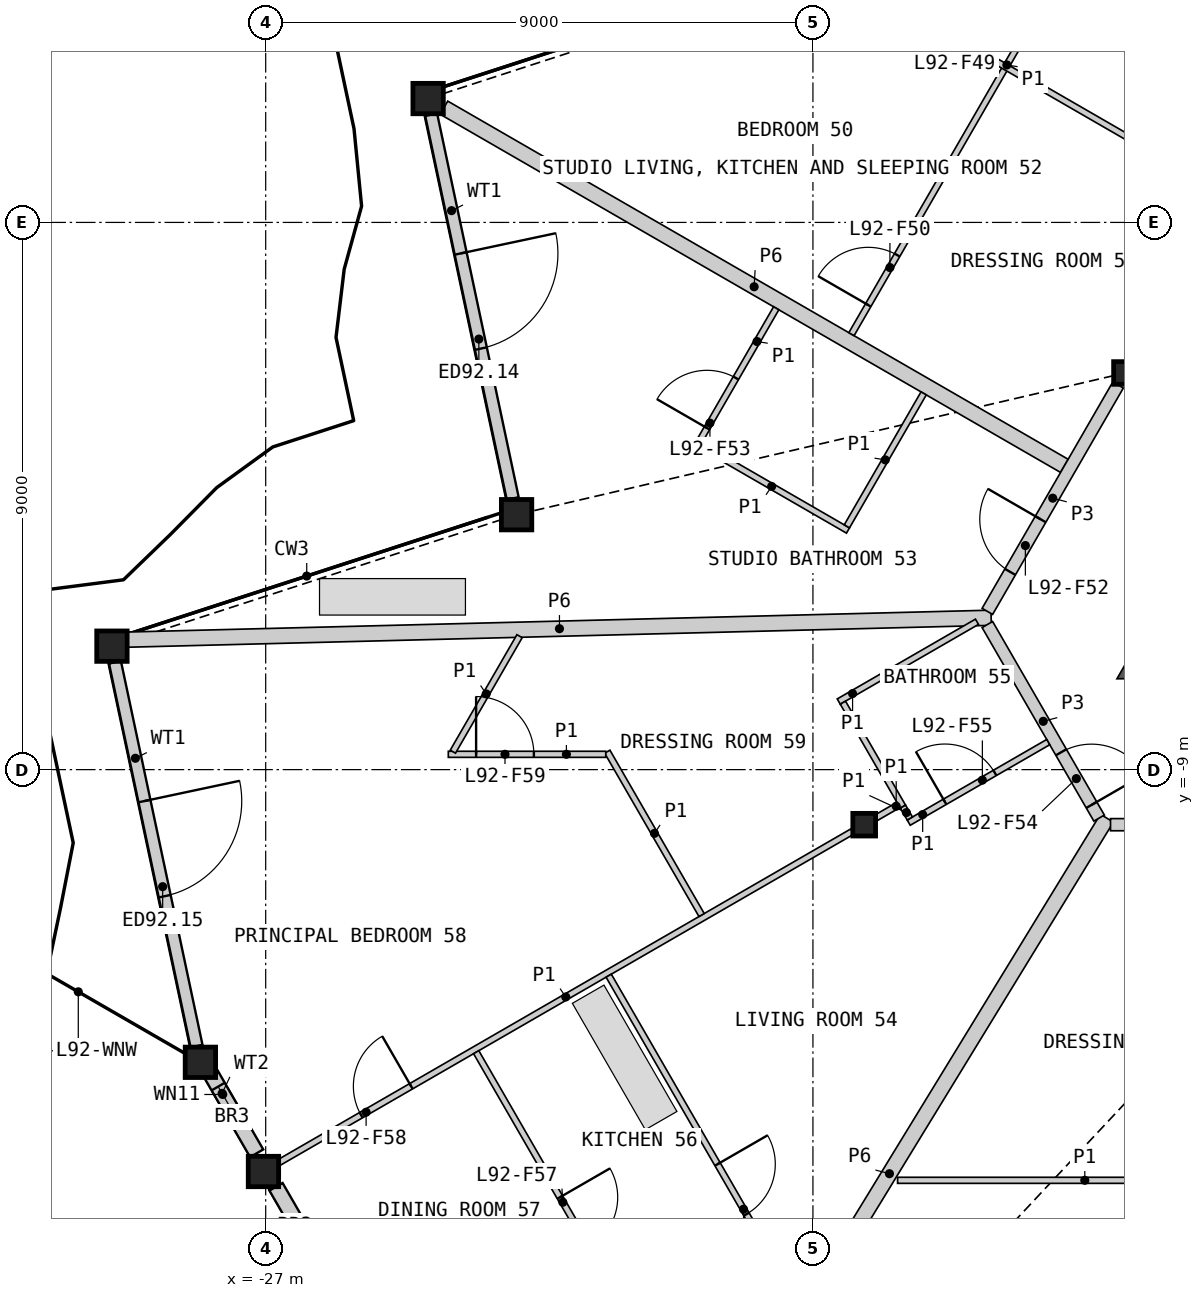
"""IFC4 building model, lengths in metres.
Left out: names, types, materials, properties, quantities, classifications, styles, units other than length and angle.
Written with IfcOpenShell. Run it as: python <this file> out.ifc"""

import sys

from ifc_helpers import new_model, si_unit, direction, frame, frame_2d, origin, origin_2d, place, context, subcontext, project, spatial, polyline, rectangle, hollow_rectangle, i_section, outline, extrude, element, fill, save


model = new_model("IFC4")
c1 = context("Model", 3, precision=1e-05, world=origin(), true_north=direction((0.0, 1.0)))
c2 = subcontext(c1, "Body", "Model", "MODEL_VIEW")
j1 = project(units=[si_unit("LENGTHUNIT", "METRE"), si_unit("PLANEANGLEUNIT", "RADIAN")], contexts=[c1])
p1 = place(None, origin())
s1 = spatial("IfcSite", under=j1, at=p1, CompositionType="ELEMENT")
p2 = place(p1, origin())
s2 = spatial("IfcBuilding", under=s1, at=p2, CompositionType="ELEMENT")
p3 = place(p2, frame((0.0, 0.0, 401.8)))
s3 = spatial("IfcBuildingStorey", under=s2, at=p3, CompositionType="ELEMENT", Elevation=401.8)
for number, where, z_axis, x_axis in (
    (1, (-24.329, 2.037, 0.0), (0.0, 0.0, 1.0), (1.0, 0.0, 0.0)),
    (2, (-22.874, -4.807, 0.0), (0.0, 0.0, 1.0), (1.0, 0.0, 0.0)),
    (3, (-29.529, -6.969, 0.0), (0.0, 0.0, 1.0), (1.0, 0.0, 0.0)),
    (4, (-28.074, -13.814, 0.0), (0.0, 0.0, 1.0), (1.0, 0.0, 0.0)),
    (5, (-27.037, -15.61, 0.0), (0.0, 0.0, 1.0), (1.0, 0.0, 0.0)),
):
    element("IfcColumn", number, at=place(p3, frame(where, z_axis=z_axis, x_axis=x_axis)), inside=s3, PredefinedType="COLUMN", context=c2, shape_type="SweptSolid", body=[
        extrude(hollow_rectangle(XDim=0.5, YDim=0.5, WallThickness=0.03, at=origin_2d()), origin(), (0.0, 0.0, 1.0), 3.4),
    ])
for number, where, z_axis, x_axis in (
    (6, (-12.868, -2.476, 0.0), (0.0, 0.0, 1.0), (1.0, 0.0, 0.0)),
    (7, (-17.157, -9.906, 0.0), (0.0, 0.0, 1.0), (1.0, 0.0, 0.0)),
):
    element("IfcColumn", number, at=place(p3, frame(where, z_axis=z_axis, x_axis=x_axis)), inside=s3, PredefinedType="COLUMN", context=c2, shape_type="SweptSolid", body=[
        extrude(i_section(OverallWidth=0.374, OverallDepth=0.372, WebThickness=0.016, FlangeThickness=0.026, at=origin_2d()), origin(), (0.0, 0.0, 1.0), 3.4),
    ])
p4 = place(p3, frame((-24.279, 1.772, 0.0), z_axis=(0.0, 0.0, 1.0), x_axis=(0.207924363149, -0.978144907061, 0.0)))
e8 = element("IfcWall", 8, at=p4, inside=s3, PredefinedType="SOLIDWALL", context=c2, shape_type="SweptSolid", body=[
    extrude(rectangle(XDim=6.453, YDim=0.2, at=frame_2d((3.227, 0.0))), origin(), (0.0, 0.0, 1.0), 2.634),
])
p5 = place(p4, frame((2.333, 0.0, 0.0)))
e9 = element("IfcOpeningElement", 9, at=p5, cuts=e8, PredefinedType="OPENING", context=c2, shape_type="SweptSolid", body=[
    extrude(rectangle(XDim=1.6, YDim=2.25, at=frame_2d((0.8, 1.125))), frame((0.0, 0.11, 0.0), z_axis=(0.0, -1.0, 0.0), x_axis=(1.0, 0.0, 0.0)), (0.0, 0.0, 1.0), 0.22),
])
p6 = place(p3, frame((-29.479, -7.235, 0.0), z_axis=(0.0, 0.0, 1.0), x_axis=(0.207932057694, -0.978143271399, 0.0)))
e10 = element("IfcWall", 10, at=p6, inside=s3, PredefinedType="SOLIDWALL", context=c2, shape_type="SweptSolid", body=[
    extrude(rectangle(XDim=6.453, YDim=0.2, at=frame_2d((3.227, 0.0))), origin(), (0.0, 0.0, 1.0), 2.634),
])
p7 = place(p6, frame((2.333, 0.0, 0.0)))
e11 = element("IfcOpeningElement", 11, at=p7, cuts=e10, PredefinedType="OPENING", context=c2, shape_type="SweptSolid", body=[
    extrude(rectangle(XDim=1.6, YDim=2.25, at=frame_2d((0.8, 1.125))), frame((0.0, 0.11, 0.0), z_axis=(0.0, -1.0, 0.0), x_axis=(1.0, 0.0, 0.0)), (0.0, 0.0, 1.0), 0.22),
])
p8 = place(p3, frame((-27.906, -13.997, 0.0), z_axis=(0.0, 0.0, 1.0), x_axis=(0.499931517724, -0.866064938435, 0.0)))
e12 = element("IfcWall", 12, at=p8, inside=s3, PredefinedType="SOLIDWALL", context=c2, shape_type="SweptSolid", body=[
    extrude(rectangle(XDim=1.516, YDim=0.25, at=frame_2d((0.758, 0.0))), origin(), (0.0, 0.0, 1.0), 2.634),
])
p9 = place(p8, frame((0.25, 0.0, 1.7)))
e13 = element("IfcOpeningElement", 13, at=p9, cuts=e12, PredefinedType="OPENING", context=c2, shape_type="SweptSolid", body=[
    extrude(rectangle(XDim=0.6, YDim=0.7, at=frame_2d((0.3, 0.35))), frame((0.0, 0.135, 0.0), z_axis=(0.0, -1.0, 0.0), x_axis=(1.0, 0.0, 0.0)), (0.0, 0.0, 1.0), 0.27),
])
p10 = place(p3, frame((-26.83, -15.861, 0.0), z_axis=(0.0, 0.0, 1.0), x_axis=(0.500048779063, -0.865997239347, 0.0)))
e14 = element("IfcWall", 14, at=p10, inside=s3, PredefinedType="SOLIDWALL", context=c2, shape_type="SweptSolid", body=[
    extrude(rectangle(XDim=1.511, YDim=0.25, at=frame_2d((0.755, 0.0))), origin(), (0.0, 0.0, 1.0), 2.634),
])
p11 = place(p3, origin())
e15 = element("IfcWall", 15, at=p11, inside=s3, PredefinedType="SHEAR", context=c2, shape_type="SweptSolid", body=[
    extrude(outline(polyline([(-12.48, -6.606), (-11.961, -6.906), (-11.961, -7.506), (-13.0, -7.506), (-12.48, -6.606)])), origin(), (0.0, 0.0, 1.0), 3.1),
])
p12 = place(p3, frame((-29.269, -6.862, 0.0), z_axis=(0.0, 0.0, 1.0), x_axis=(0.999679020594, 0.025334872878, 0.0)))
e16 = element("IfcWall", 16, at=p12, inside=s3, PredefinedType="PARTITIONING", context=c2, shape_type="SweptSolid", body=[
    extrude(rectangle(XDim=14.204, YDim=0.25, at=frame_2d((7.102, 0.0))), origin(), (0.0, 0.0, 1.0), 2.33),
])
p13 = place(p3, frame((-20.318, -21.493, 0.0), z_axis=(0.0, 0.0, 1.0), x_axis=(0.52177126778, 0.853085426039, 0.0)))
e17 = element("IfcWall", 17, at=p13, inside=s3, PredefinedType="PARTITIONING", context=c2, shape_type="SweptSolid", body=[
    extrude(rectangle(XDim=13.708, YDim=0.25, at=frame_2d((6.854, 0.0))), origin(), (0.0, 0.0, 1.0), 2.33),
])
p14 = place(p3, frame((-24.069, 1.887, 0.0), z_axis=(0.0, 0.0, 1.0), x_axis=(0.866023404247, -0.500003463284, 0.0)))
e18 = element("IfcWall", 18, at=p14, inside=s3, PredefinedType="PARTITIONING", context=c2, shape_type="SweptSolid", body=[
    extrude(rectangle(XDim=11.782, YDim=0.25, at=frame_2d((5.891, 0.0))), origin(), (0.0, 0.0, 1.0), 2.33),
])
p15 = place(p3, frame((-13.106, -9.906, 0.0), z_axis=(0.0, 0.0, 1.0), x_axis=(1.0, 0.0, 0.0)))
e19 = element("IfcWall", 19, at=p15, inside=s3, PredefinedType="PARTITIONING", context=c2, shape_type="SweptSolid", body=[
    extrude(rectangle(XDim=4.331, YDim=0.2, at=frame_2d((2.165, 0.0))), origin(), (0.0, 0.0, 1.0), 3.1),
])
p16 = place(p3, frame((-15.131, -6.397, 0.0), z_axis=(0.0, 0.0, 1.0), x_axis=(0.499986217557, 0.866033360935, 0.0)))
e20 = element("IfcWall", 20, at=p16, inside=s3, PredefinedType="PARTITIONING", context=c2, shape_type="SweptSolid", body=[
    extrude(rectangle(XDim=4.3, YDim=0.2, at=frame_2d((2.15, 0.0))), origin(), (0.0, 0.0, 1.0), 3.1),
])
p17 = place(p16, frame((0.75, 0.0, 0.0)))
e21 = element("IfcOpeningElement", 21, at=p17, cuts=e20, PredefinedType="OPENING", context=c2, shape_type="SweptSolid", body=[
    extrude(rectangle(XDim=1.0, YDim=2.1, at=frame_2d((0.5, 1.05))), frame((0.0, 0.11, 0.0), z_axis=(0.0, -1.0, 0.0), x_axis=(1.0, 0.0, 0.0)), (0.0, 0.0, 1.0), 0.22),
])
p18 = place(p3, frame((-15.131, -6.614, 0.0), z_axis=(0.0, 0.0, 1.0), x_axis=(0.499967746641, -0.866044024469, 0.0)))
e22 = element("IfcWall", 22, at=p18, inside=s3, PredefinedType="PARTITIONING", context=c2, shape_type="SweptSolid", body=[
    extrude(rectangle(XDim=3.676, YDim=0.2, at=frame_2d((1.838, 0.0))), origin(), (0.0, 0.0, 1.0), 3.1),
])
p19 = place(p18, frame((2.426, 0.0, 0.0)))
e23 = element("IfcOpeningElement", 23, at=p19, cuts=e22, PredefinedType="OPENING", context=c2, shape_type="SweptSolid", body=[
    extrude(rectangle(XDim=1.0, YDim=2.1, at=frame_2d((0.5, 1.05))), frame((0.0, 0.11, 0.0), z_axis=(0.0, -1.0, 0.0), x_axis=(1.0, 0.0, 0.0)), (0.0, 0.0, 1.0), 0.22),
])
p20 = place(p3, frame((-26.777, -15.46, 0.0), z_axis=(0.0, 0.0, 1.0), x_axis=(0.866019680922, 0.500009912158, 0.0)))
e24 = element("IfcWall", 24, at=p20, inside=s3, PredefinedType="PARTITIONING", context=c2, shape_type="SweptSolid", body=[
    extrude(rectangle(XDim=10.881, YDim=0.1, at=frame_2d((5.44, 0.0))), origin(), (0.0, 0.0, 1.0), 2.33),
])
p21 = place(p20, frame((1.554, 0.0, 0.0)))
e25 = element("IfcOpeningElement", 25, at=p21, cuts=e24, PredefinedType="OPENING", context=c2, shape_type="SweptSolid", body=[
    extrude(rectangle(XDim=0.95, YDim=2.1, at=frame_2d((0.475, 1.05))), frame((0.0, 0.06, 0.0), z_axis=(0.0, -1.0, 0.0), x_axis=(1.0, 0.0, 0.0)), (0.0, 0.0, 1.0), 0.12),
])
p22 = place(p3, frame((-17.366, -1.838, 0.0), z_axis=(0.0, 0.0, 1.0), x_axis=(0.499998717582, 0.866026144187, 0.0)))
e26 = element("IfcWall", 26, at=p22, inside=s3, PredefinedType="PARTITIONING", context=c2, shape_type="SweptSolid", body=[
    extrude(rectangle(XDim=10.225, YDim=0.1, at=frame_2d((5.113, 0.0))), origin(), (0.0, 0.0, 1.0), 2.33),
])
p23 = place(p22, frame((6.907, 0.0, 0.0)))
e27 = element("IfcOpeningElement", 27, at=p23, cuts=e26, PredefinedType="OPENING", context=c2, shape_type="SweptSolid", body=[
    extrude(rectangle(XDim=0.95, YDim=2.1, at=frame_2d((0.475, 1.05))), frame((0.0, 0.06, 0.0), z_axis=(0.0, -1.0, 0.0), x_axis=(1.0, 0.0, 0.0)), (0.0, 0.0, 1.0), 0.12),
])
p24 = place(p22, frame((0.552, 0.0, 0.0)))
e28 = element("IfcOpeningElement", 28, at=p24, cuts=e26, PredefinedType="OPENING", context=c2, shape_type="SweptSolid", body=[
    extrude(rectangle(XDim=0.95, YDim=2.1, at=frame_2d((0.475, 1.05))), frame((0.0, 0.06, 0.0), z_axis=(0.0, -1.0, 0.0), x_axis=(1.0, 0.0, 0.0)), (0.0, 0.0, 1.0), 0.12),
])
p25 = place(p3, frame((-23.538, -13.647, 0.0), z_axis=(0.0, 0.0, 1.0), x_axis=(0.499977115003, -0.86603861604, 0.0)))
e29 = element("IfcWall", 29, at=p25, inside=s3, PredefinedType="PARTITIONING", context=c2, shape_type="SweptSolid", body=[
    extrude(rectangle(XDim=7.662, YDim=0.1, at=frame_2d((3.831, 0.0))), origin(), (0.0, 0.0, 1.0), 2.33),
])
p26 = place(p25, frame((2.755, 0.0, 0.0)))
e30 = element("IfcOpeningElement", 30, at=p26, cuts=e29, PredefinedType="OPENING", context=c2, shape_type="SweptSolid", body=[
    extrude(rectangle(XDim=0.95, YDim=2.1, at=frame_2d((0.475, 1.05))), frame((0.0, 0.06, 0.0), z_axis=(0.0, -1.0, 0.0), x_axis=(1.0, 0.0, 0.0)), (0.0, 0.0, 1.0), 0.12),
])
p27 = place(p3, frame((-17.414, 4.049, 0.0), z_axis=(0.0, 0.0, 1.0), x_axis=(0.866033839264, -0.499985389037, 0.0)))
e31 = element("IfcWall", 31, at=p27, inside=s3, PredefinedType="PARTITIONING", context=c2, shape_type="SweptSolid", body=[
    extrude(rectangle(XDim=7.1, YDim=0.1, at=frame_2d((3.55, 0.0))), origin(), (0.0, 0.0, 1.0), 2.33),
])
p28 = place(p27, frame((1.158, 0.0, 0.0)))
e32 = element("IfcOpeningElement", 32, at=p28, cuts=e31, PredefinedType="OPENING", context=c2, shape_type="SweptSolid", body=[
    extrude(rectangle(XDim=0.95, YDim=2.1, at=frame_2d((0.475, 1.05))), frame((0.0, 0.06, 0.0), z_axis=(0.0, -1.0, 0.0), x_axis=(1.0, 0.0, 0.0)), (0.0, 0.0, 1.0), 0.12),
])
p29 = place(p3, frame((-21.359, -12.389, 0.0), z_axis=(0.0, 0.0, 1.0), x_axis=(0.500006767202, -0.866021496703, 0.0)))
e33 = element("IfcWall", 33, at=p29, inside=s3, PredefinedType="PARTITIONING", context=c2, shape_type="SweptSolid", body=[
    extrude(rectangle(XDim=6.293, YDim=0.1, at=frame_2d((3.147, 0.0))), origin(), (0.0, 0.0, 1.0), 2.33),
])
p30 = place(p29, frame((3.58, 0.0, 0.0)))
e34 = element("IfcOpeningElement", 34, at=p30, cuts=e33, PredefinedType="OPENING", context=c2, shape_type="SweptSolid", body=[
    extrude(rectangle(XDim=0.95, YDim=2.1, at=frame_2d((0.475, 1.05))), frame((0.0, 0.06, 0.0), z_axis=(0.0, -1.0, 0.0), x_axis=(1.0, 0.0, 0.0)), (0.0, 0.0, 1.0), 0.12),
])
p31 = place(p3, frame((-16.608, -15.755, 0.0), z_axis=(0.0, 0.0, 1.0), x_axis=(1.0, 0.0, 0.0)))
e35 = element("IfcWall", 35, at=p31, inside=s3, PredefinedType="PARTITIONING", context=c2, shape_type="SweptSolid", body=[
    extrude(rectangle(XDim=6.158, YDim=0.1, at=frame_2d((3.079, 0.0))), origin(), (0.0, 0.0, 1.0), 2.33),
])
p32 = place(p31, frame((4.357, 0.0, 0.0)))
e36 = element("IfcOpeningElement", 36, at=p32, cuts=e35, PredefinedType="OPENING", context=c2, shape_type="SweptSolid", body=[
    extrude(rectangle(XDim=0.95, YDim=2.1, at=frame_2d((0.475, 1.05))), frame((0.0, 0.06, 0.0), z_axis=(0.0, -1.0, 0.0), x_axis=(1.0, 0.0, 0.0)), (0.0, 0.0, 1.0), 0.12),
])
p33 = place(p3, frame((-21.382, -8.705, 0.0), z_axis=(0.0, 0.0, 1.0), x_axis=(0.50001536203, -0.866016534331, 0.0)))
e37 = element("IfcWall", 37, at=p33, inside=s3, PredefinedType="PARTITIONING", context=c2, shape_type="SweptSolid", body=[
    extrude(rectangle(XDim=3.103, YDim=0.1, at=frame_2d((1.551, 0.0))), origin(), (0.0, 0.0, 1.0), 2.33),
])
p34 = place(p3, frame((-19.935, -3.617, 0.0), z_axis=(0.0, 0.0, 1.0), x_axis=(0.866032775405, -0.499987231761, 0.0)))
e38 = element("IfcWall", 38, at=p34, inside=s3, PredefinedType="PARTITIONING", context=c2, shape_type="SweptSolid", body=[
    extrude(rectangle(XDim=2.9, YDim=0.1, at=frame_2d((1.45, 0.0))), origin(), (0.0, 0.0, 1.0), 2.33),
])
p35 = place(p3, frame((-17.442, -4.999, 0.0), z_axis=(0.0, 0.0, 1.0), x_axis=(0.499976333282, 0.866039067339, 0.0)))
e39 = element("IfcWall", 39, at=p35, inside=s3, PredefinedType="PARTITIONING", context=c2, shape_type="SweptSolid", body=[
    extrude(rectangle(XDim=2.525, YDim=0.1, at=frame_2d((1.262, 0.0))), origin(), (0.0, 0.0, 1.0), 2.33),
])
p36 = place(p3, frame((-19.867, -3.599, 0.0), z_axis=(0.0, 0.0, 1.0), x_axis=(0.500048846702, 0.865997200291, 0.0)))
e40 = element("IfcWall", 40, at=p36, inside=s3, PredefinedType="PARTITIONING", context=c2, shape_type="SweptSolid", body=[
    extrude(rectangle(XDim=2.525, YDim=0.1, at=frame_2d((1.263, 0.0))), origin(), (0.0, 0.0, 1.0), 2.33),
])
p37 = place(p36, frame((0.25, 0.0, 0.0)))
e41 = element("IfcOpeningElement", 41, at=p37, cuts=e40, PredefinedType="OPENING", context=c2, shape_type="SweptSolid", body=[
    extrude(rectangle(XDim=0.95, YDim=2.1, at=frame_2d((0.475, 1.05))), frame((0.0, 0.06, 0.0), z_axis=(0.0, -1.0, 0.0), x_axis=(1.0, 0.0, 0.0)), (0.0, 0.0, 1.0), 0.12),
])
p38 = place(p3, frame((-17.575, -7.881, 0.0), z_axis=(0.0, 0.0, 1.0), x_axis=(0.866013657776, 0.500020344131, 0.0)))
e42 = element("IfcWall", 42, at=p38, inside=s3, PredefinedType="PARTITIONING", context=c2, shape_type="SweptSolid", body=[
    extrude(rectangle(XDim=2.625, YDim=0.1, at=frame_2d((1.312, 0.0))), origin(), (0.0, 0.0, 1.0), 2.33),
])
p39 = place(p3, frame((-16.425, -9.872, 0.0), z_axis=(0.0, 0.0, 1.0), x_axis=(0.865999882481, 0.50004420159, 0.0)))
e43 = element("IfcWall", 43, at=p39, inside=s3, PredefinedType="PARTITIONING", context=c2, shape_type="SweptSolid", body=[
    extrude(rectangle(XDim=2.649, YDim=0.1, at=frame_2d((1.325, 0.0))), origin(), (0.0, 0.0, 1.0), 2.33),
])
p40 = place(p39, frame((0.686, 0.0, 0.0)))
e44 = element("IfcOpeningElement", 44, at=p40, cuts=e43, PredefinedType="OPENING", context=c2, shape_type="SweptSolid", body=[
    extrude(rectangle(XDim=0.95, YDim=2.1, at=frame_2d((0.475, 1.05))), frame((0.0, 0.06, 0.0), z_axis=(0.0, -1.0, 0.0), x_axis=(1.0, 0.0, 0.0)), (0.0, 0.0, 1.0), 0.12),
])
p41 = place(p3, frame((-23.997, -8.748, 0.0), z_axis=(0.0, 0.0, 1.0), x_axis=(1.0, 0.0, 0.0)))
e45 = element("IfcWall", 45, at=p41, inside=s3, PredefinedType="PARTITIONING", context=c2, shape_type="SweptSolid", body=[
    extrude(rectangle(XDim=2.59, YDim=0.1, at=frame_2d((1.295, 0.0))), origin(), (0.0, 0.0, 1.0), 2.33),
])
p42 = place(p41, frame((0.457, 0.0, 0.0)))
e46 = element("IfcOpeningElement", 46, at=p42, cuts=e45, PredefinedType="OPENING", context=c2, shape_type="SweptSolid", body=[
    extrude(rectangle(XDim=0.95, YDim=2.1, at=frame_2d((0.475, 1.05))), frame((0.0, 0.06, 0.0), z_axis=(0.0, -1.0, 0.0), x_axis=(1.0, 0.0, 0.0)), (0.0, 0.0, 1.0), 0.12),
])
p43 = place(p3, frame((-23.922, -8.705, 0.0), z_axis=(0.0, 0.0, 1.0), x_axis=(0.50001794124, 0.866015045157, 0.0)))
e47 = element("IfcWall", 47, at=p43, inside=s3, PredefinedType="PARTITIONING", context=c2, shape_type="SweptSolid", body=[
    extrude(rectangle(XDim=2.193, YDim=0.1, at=frame_2d((1.097, 0.0))), origin(), (0.0, 0.0, 1.0), 2.33),
])
p44 = place(p3, frame((-17.507, -7.899, 0.0), z_axis=(0.0, 0.0, 1.0), x_axis=(0.499972416139, -0.866041328748, 0.0)))
e48 = element("IfcWall", 48, at=p44, inside=s3, PredefinedType="PARTITIONING", context=c2, shape_type="SweptSolid", body=[
    extrude(rectangle(XDim=1.973, YDim=0.1, at=frame_2d((0.986, 0.0))), origin(), (0.0, 0.0, 1.0), 2.33),
])
p45 = place(p3, frame((-16.96, -9.792, 0.0), z_axis=(0.0, 0.0, 1.0), x_axis=(0.866137484628, 0.499805820016, 0.0)))
e49 = element("IfcWall", 49, at=p45, inside=s3, PredefinedType="PARTITIONING", context=c2, shape_type="SweptSolid", body=[
    extrude(rectangle(XDim=0.423, YDim=0.1, at=frame_2d((0.211, 0.0))), origin(), (0.0, 0.0, 1.0), 2.33),
])
p46 = place(p3, frame((-16.519, -9.61, 0.0), z_axis=(0.0, 0.0, 1.0), x_axis=(0.50245032488, -0.864606078528, 0.0)))
e50 = element("IfcWall", 50, at=p46, inside=s3, PredefinedType="PARTITIONING", context=c2, shape_type="SweptSolid", body=[
    extrude(rectangle(XDim=0.224, YDim=0.1, at=frame_2d((0.112, 0.0))), origin(), (0.0, 0.0, 1.0), 2.33),
])
p47 = place(p5, origin())
e51 = element("IfcDoor", 51, at=p47, inside=s3, OperationType="DOUBLE_DOOR_SINGLE_SWING", PredefinedType="DOOR", context=c2, shape_type="SweptSolid", body=[
    extrude(rectangle(XDim=1.6, YDim=2.25, at=frame_2d((0.8, 1.125))), frame((0.0, 0.025, 0.0), z_axis=(0.0, -1.0, 0.0), x_axis=(1.0, 0.0, 0.0)), (0.0, 0.0, 1.0), 0.05),
])
fill(e9, e51)
p48 = place(p7, origin())
e52 = element("IfcDoor", 52, at=p48, inside=s3, OperationType="DOUBLE_DOOR_SINGLE_SWING", PredefinedType="DOOR", context=c2, shape_type="SweptSolid", body=[
    extrude(rectangle(XDim=1.6, YDim=2.25, at=frame_2d((0.8, 1.125))), frame((0.0, 0.025, 0.0), z_axis=(0.0, -1.0, 0.0), x_axis=(1.0, 0.0, 0.0)), (0.0, 0.0, 1.0), 0.05),
])
fill(e11, e52)
p49 = place(p9, origin())
e53 = element("IfcWindow", 53, at=p49, inside=s3, PartitioningType="SINGLE_PANEL", PredefinedType="WINDOW", context=c2, shape_type="SweptSolid", body=[
    extrude(rectangle(XDim=0.6, YDim=0.7, at=frame_2d((0.3, 0.35))), frame((0.0, 0.03, 0.0), z_axis=(0.0, -1.0, 0.0), x_axis=(1.0, 0.0, 0.0)), (0.0, 0.0, 1.0), 0.06),
])
fill(e13, e53)
p50 = place(p24, origin())
e54 = element("IfcDoor", 54, at=p50, inside=s3, OperationType="SINGLE_SWING_LEFT", PredefinedType="DOOR", context=c2, shape_type="SweptSolid", body=[
    extrude(rectangle(XDim=0.95, YDim=2.1, at=frame_2d((0.475, 1.05))), frame((0.0, 0.025, 0.0), z_axis=(0.0, -1.0, 0.0), x_axis=(1.0, 0.0, 0.0)), (0.0, 0.0, 1.0), 0.05),
])
fill(e28, e54)
p51 = place(p17, origin())
e55 = element("IfcDoor", 55, at=p51, inside=s3, OperationType="SINGLE_SWING_RIGHT", PredefinedType="DOOR", context=c2, shape_type="SweptSolid", body=[
    extrude(rectangle(XDim=1.0, YDim=2.1, at=frame_2d((0.5, 1.05))), frame((0.0, 0.025, 0.0), z_axis=(0.0, -1.0, 0.0), x_axis=(1.0, 0.0, 0.0)), (0.0, 0.0, 1.0), 0.05),
])
fill(e21, e55)
p52 = place(p37, origin())
e56 = element("IfcDoor", 56, at=p52, inside=s3, OperationType="SINGLE_SWING_LEFT", PredefinedType="DOOR", context=c2, shape_type="SweptSolid", body=[
    extrude(rectangle(XDim=0.95, YDim=2.1, at=frame_2d((0.475, 1.05))), frame((0.0, 0.025, 0.0), z_axis=(0.0, -1.0, 0.0), x_axis=(1.0, 0.0, 0.0)), (0.0, 0.0, 1.0), 0.05),
])
fill(e41, e56)
p53 = place(p19, origin())
e57 = element("IfcDoor", 57, at=p53, inside=s3, OperationType="SINGLE_SWING_RIGHT", PredefinedType="DOOR", context=c2, shape_type="SweptSolid", body=[
    extrude(rectangle(XDim=1.0, YDim=2.1, at=frame_2d((0.5, 1.05))), frame((0.0, 0.025, 0.0), z_axis=(0.0, -1.0, 0.0), x_axis=(1.0, 0.0, 0.0)), (0.0, 0.0, 1.0), 0.05),
])
fill(e23, e57)
p54 = place(p40, origin())
e58 = element("IfcDoor", 58, at=p54, inside=s3, OperationType="SINGLE_SWING_LEFT", PredefinedType="DOOR", context=c2, shape_type="SweptSolid", body=[
    extrude(rectangle(XDim=0.95, YDim=2.1, at=frame_2d((0.475, 1.05))), frame((0.0, 0.025, 0.0), z_axis=(0.0, -1.0, 0.0), x_axis=(1.0, 0.0, 0.0)), (0.0, 0.0, 1.0), 0.05),
])
fill(e44, e58)
p55 = place(p30, origin())
e59 = element("IfcDoor", 59, at=p55, inside=s3, OperationType="SINGLE_SWING_LEFT", PredefinedType="DOOR", context=c2, shape_type="SweptSolid", body=[
    extrude(rectangle(XDim=0.95, YDim=2.1, at=frame_2d((0.475, 1.05))), frame((0.0, 0.025, 0.0), z_axis=(0.0, -1.0, 0.0), x_axis=(1.0, 0.0, 0.0)), (0.0, 0.0, 1.0), 0.05),
])
fill(e34, e59)
p56 = place(p26, origin())
e60 = element("IfcDoor", 60, at=p56, inside=s3, OperationType="SINGLE_SWING_LEFT", PredefinedType="DOOR", context=c2, shape_type="SweptSolid", body=[
    extrude(rectangle(XDim=0.95, YDim=2.1, at=frame_2d((0.475, 1.05))), frame((0.0, 0.025, 0.0), z_axis=(0.0, -1.0, 0.0), x_axis=(1.0, 0.0, 0.0)), (0.0, 0.0, 1.0), 0.05),
])
fill(e30, e60)
p57 = place(p21, origin())
e61 = element("IfcDoor", 61, at=p57, inside=s3, OperationType="SINGLE_SWING_RIGHT", PredefinedType="DOOR", context=c2, shape_type="SweptSolid", body=[
    extrude(rectangle(XDim=0.95, YDim=2.1, at=frame_2d((0.475, 1.05))), frame((0.0, 0.025, 0.0), z_axis=(0.0, -1.0, 0.0), x_axis=(1.0, 0.0, 0.0)), (0.0, 0.0, 1.0), 0.05),
])
fill(e25, e61)
p58 = place(p42, origin())
e62 = element("IfcDoor", 62, at=p58, inside=s3, OperationType="SINGLE_SWING_LEFT", PredefinedType="DOOR", context=c2, shape_type="SweptSolid", body=[
    extrude(rectangle(XDim=0.95, YDim=2.1, at=frame_2d((0.475, 1.05))), frame((0.0, 0.025, 0.0), z_axis=(0.0, -1.0, 0.0), x_axis=(1.0, 0.0, 0.0)), (0.0, 0.0, 1.0), 0.05),
])
fill(e46, e62)
save(model, sys.argv[1])
